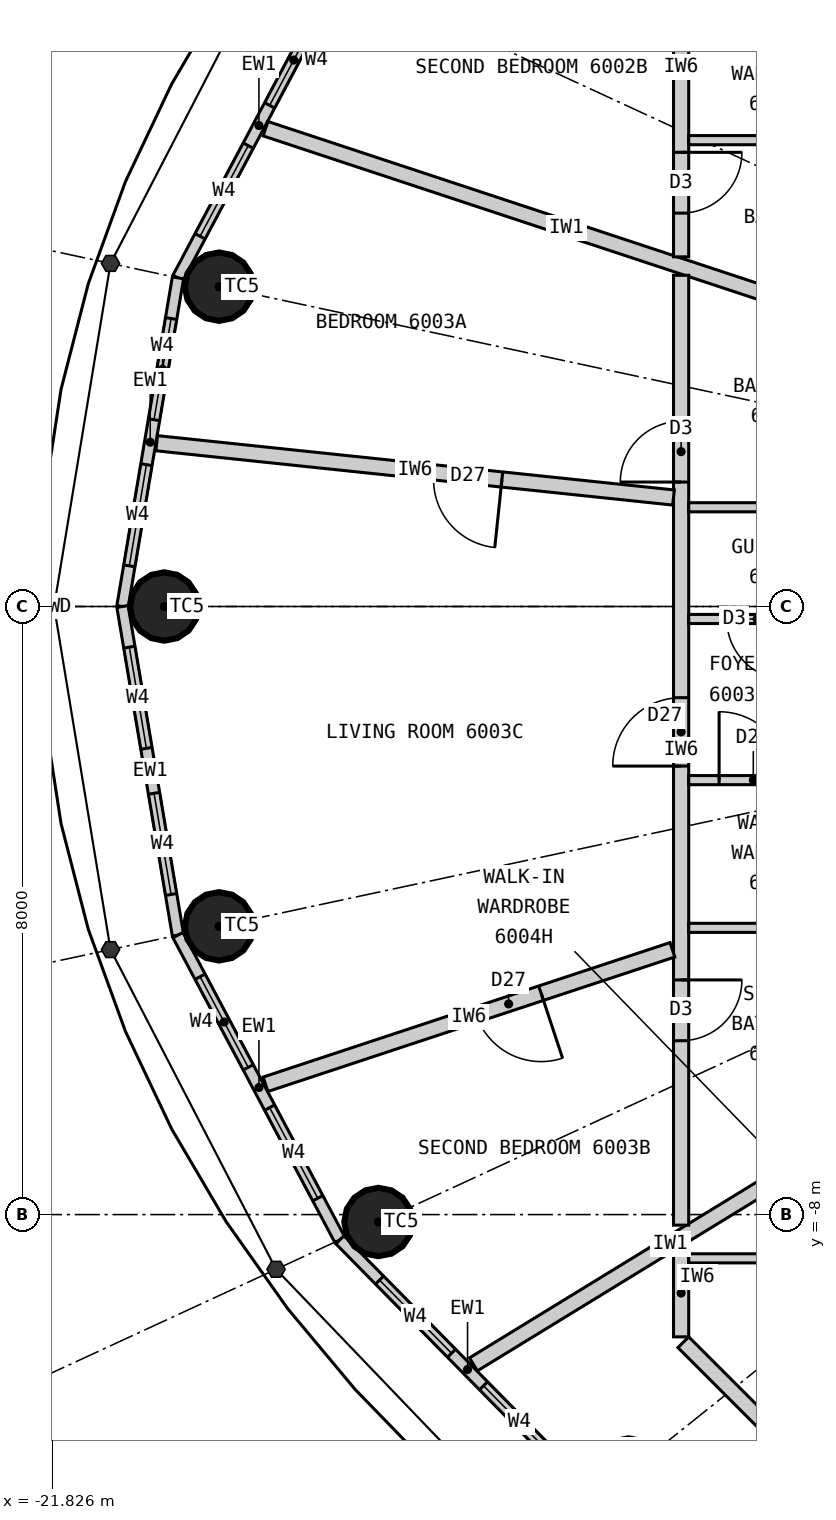
"""IFC4 building model, lengths in metres.
Left out: names, types, materials, properties, quantities, classifications, styles, units other than length and angle.
Written with IfcOpenShell. Run it as: python <this file> out.ifc"""

import sys

from ifc_helpers import new_model, si_unit, direction, frame, frame_2d, origin, origin_2d, place, context, subcontext, project, spatial, rectangle, circle, extrude, element, fill, save


model = new_model("IFC4")
c1 = context("Model", 3, precision=1e-05, world=origin(), true_north=direction((0.0, 1.0)))
c2 = subcontext(c1, "Body", "Model", "MODEL_VIEW")
j1 = project(units=[si_unit("LENGTHUNIT", "METRE"), si_unit("PLANEANGLEUNIT", "RADIAN")], contexts=[c1])
p1 = place(None, origin())
s1 = spatial("IfcSite", under=j1, at=p1, CompositionType="ELEMENT")
p2 = place(p1, origin())
s2 = spatial("IfcBuilding", under=s1, at=p2, CompositionType="ELEMENT")
p3 = place(p2, frame((0.0, 0.0, 222.6)))
s3 = spatial("IfcBuildingStorey", under=s2, at=p3, CompositionType="ELEMENT", Elevation=222.6)
for number, where, z_axis, x_axis in (
    (1, (-19.629, 4.208, 0.0), (0.0, 0.0, 1.0), (1.0, 0.0, 0.0)),
    (2, (-20.35, 0.0, 0.0), (0.0, 0.0, 1.0), (1.0, 0.0, 0.0)),
    (3, (-19.629, -4.208, 0.0), (0.0, 0.0, 1.0), (1.0, 0.0, 0.0)),
    (4, (-17.532, -8.098, 0.0), (0.0, 0.0, 1.0), (1.0, 0.0, 0.0)),
    (5, (-14.241, -11.393, 0.0), (0.0, 0.0, 1.0), (1.0, 0.0, 0.0)),
):
    element("IfcColumn", number, at=place(p3, frame(where, z_axis=z_axis, x_axis=x_axis)), inside=s3, PredefinedType="COLUMN", context=c2, shape_type="SweptSolid", body=[
        extrude(circle(Radius=0.45, at=origin_2d()), origin(), (0.0, 0.0, 1.0), 3.3),
    ])
p4 = place(p3, frame((-18.04, 8.332, 0.0), z_axis=(0.0, 0.0, 1.0), x_axis=(-0.469256152955, -0.883062094597, 0.0)))
e6 = element("IfcWall", 6, at=p4, inside=s3, PredefinedType="ELEMENTEDWALL", context=c2, shape_type="SweptSolid", body=[
    extrude(rectangle(XDim=4.539, YDim=0.15, at=frame_2d((2.27, 0.0))), origin(), (0.0, 0.0, 1.0), 3.12),
])
p5 = place(p4, frame((0.62, 0.0, 0.9)))
e7 = element("IfcOpeningElement", 7, at=p5, cuts=e6, PredefinedType="OPENING", context=c2, shape_type="SweptSolid", body=[
    extrude(rectangle(XDim=1.35, YDim=1.9, at=frame_2d((0.675, 0.95))), frame((0.0, 0.085, 0.0), z_axis=(0.0, -1.0, 0.0), x_axis=(1.0, 0.0, 0.0)), (0.0, 0.0, 1.0), 0.17),
])
p6 = place(p4, frame((2.57, 0.0, 0.9)))
e8 = element("IfcOpeningElement", 8, at=p6, cuts=e6, PredefinedType="OPENING", context=c2, shape_type="SweptSolid", body=[
    extrude(rectangle(XDim=1.35, YDim=1.9, at=frame_2d((0.675, 0.95))), frame((0.0, 0.085, 0.0), z_axis=(0.0, -1.0, 0.0), x_axis=(1.0, 0.0, 0.0)), (0.0, 0.0, 1.0), 0.17),
])
p7 = place(p3, frame((-20.17, 4.323, 0.0), z_axis=(0.0, 0.0, 1.0), x_axis=(-0.166538513568, -0.986034950445, 0.0)))
e9 = element("IfcWall", 9, at=p7, inside=s3, PredefinedType="ELEMENTEDWALL", context=c2, shape_type="SweptSolid", body=[
    extrude(rectangle(XDim=4.385, YDim=0.15, at=frame_2d((2.192, 0.0))), origin(), (0.0, 0.0, 1.0), 3.12),
])
p8 = place(p7, frame((0.542, 0.0, 0.9)))
e10 = element("IfcOpeningElement", 10, at=p8, cuts=e9, PredefinedType="OPENING", context=c2, shape_type="SweptSolid", body=[
    extrude(rectangle(XDim=1.35, YDim=1.9, at=frame_2d((0.675, 0.95))), frame((0.0, 0.085, 0.0), z_axis=(0.0, -1.0, 0.0), x_axis=(1.0, 0.0, 0.0)), (0.0, 0.0, 1.0), 0.17),
])
p9 = place(p7, frame((2.492, 0.0, 0.9)))
e11 = element("IfcOpeningElement", 11, at=p9, cuts=e9, PredefinedType="OPENING", context=c2, shape_type="SweptSolid", body=[
    extrude(rectangle(XDim=1.35, YDim=1.9, at=frame_2d((0.675, 0.95))), frame((0.0, 0.085, 0.0), z_axis=(0.0, -1.0, 0.0), x_axis=(1.0, 0.0, 0.0)), (0.0, 0.0, 1.0), 0.17),
])
p10 = place(p3, frame((-20.9, 0.0, 0.0), z_axis=(0.0, 0.0, 1.0), x_axis=(0.166538513568, -0.986034950445, 0.0)))
e12 = element("IfcWall", 12, at=p10, inside=s3, PredefinedType="ELEMENTEDWALL", context=c2, shape_type="SweptSolid", body=[
    extrude(rectangle(XDim=4.385, YDim=0.15, at=frame_2d((2.192, 0.0))), origin(), (0.0, 0.0, 1.0), 3.12),
])
p11 = place(p10, frame((0.542, 0.0, 0.9)))
e13 = element("IfcOpeningElement", 13, at=p11, cuts=e12, PredefinedType="OPENING", context=c2, shape_type="SweptSolid", body=[
    extrude(rectangle(XDim=1.35, YDim=1.9, at=frame_2d((0.675, 0.95))), frame((0.0, 0.085, 0.0), z_axis=(0.0, -1.0, 0.0), x_axis=(1.0, 0.0, 0.0)), (0.0, 0.0, 1.0), 0.17),
])
p12 = place(p10, frame((2.492, 0.0, 0.9)))
e14 = element("IfcOpeningElement", 14, at=p12, cuts=e12, PredefinedType="OPENING", context=c2, shape_type="SweptSolid", body=[
    extrude(rectangle(XDim=1.35, YDim=1.9, at=frame_2d((0.675, 0.95))), frame((0.0, 0.085, 0.0), z_axis=(0.0, -1.0, 0.0), x_axis=(1.0, 0.0, 0.0)), (0.0, 0.0, 1.0), 0.17),
])
p13 = place(p3, frame((-20.17, -4.323, 0.0), z_axis=(0.0, 0.0, 1.0), x_axis=(0.469256152955, -0.883062094597, 0.0)))
e15 = element("IfcWall", 15, at=p13, inside=s3, PredefinedType="ELEMENTEDWALL", context=c2, shape_type="SweptSolid", body=[
    extrude(rectangle(XDim=4.539, YDim=0.15, at=frame_2d((2.27, 0.0))), origin(), (0.0, 0.0, 1.0), 3.12),
])
p14 = place(p13, frame((0.62, 0.0, 0.9)))
e16 = element("IfcOpeningElement", 16, at=p14, cuts=e15, PredefinedType="OPENING", context=c2, shape_type="SweptSolid", body=[
    extrude(rectangle(XDim=1.35, YDim=1.9, at=frame_2d((0.675, 0.95))), frame((0.0, 0.085, 0.0), z_axis=(0.0, -1.0, 0.0), x_axis=(1.0, 0.0, 0.0)), (0.0, 0.0, 1.0), 0.17),
])
p15 = place(p13, frame((2.57, 0.0, 0.9)))
e17 = element("IfcOpeningElement", 17, at=p15, cuts=e15, PredefinedType="OPENING", context=c2, shape_type="SweptSolid", body=[
    extrude(rectangle(XDim=1.35, YDim=1.9, at=frame_2d((0.675, 0.95))), frame((0.0, 0.085, 0.0), z_axis=(0.0, -1.0, 0.0), x_axis=(1.0, 0.0, 0.0)), (0.0, 0.0, 1.0), 0.17),
])
p16 = place(p3, frame((-18.04, -8.332, 0.0), z_axis=(0.0, 0.0, 1.0), x_axis=(0.701527379618, -0.712642501993, 0.0)))
e18 = element("IfcWall", 18, at=p16, inside=s3, PredefinedType="ELEMENTEDWALL", context=c2, shape_type="SweptSolid", body=[
    extrude(rectangle(XDim=4.788, YDim=0.15, at=frame_2d((2.394, 0.0))), origin(), (0.0, 0.0, 1.0), 3.12),
])
p17 = place(p16, frame((0.744, 0.0, 0.9)))
e19 = element("IfcOpeningElement", 19, at=p17, cuts=e18, PredefinedType="OPENING", context=c2, shape_type="SweptSolid", body=[
    extrude(rectangle(XDim=1.35, YDim=1.9, at=frame_2d((0.675, 0.95))), frame((0.0, 0.085, 0.0), z_axis=(0.0, -1.0, 0.0), x_axis=(1.0, 0.0, 0.0)), (0.0, 0.0, 1.0), 0.17),
])
p18 = place(p16, frame((2.694, 0.0, 0.9)))
e20 = element("IfcOpeningElement", 20, at=p18, cuts=e18, PredefinedType="OPENING", context=c2, shape_type="SweptSolid", body=[
    extrude(rectangle(XDim=1.35, YDim=1.9, at=frame_2d((0.675, 0.95))), frame((0.0, 0.085, 0.0), z_axis=(0.0, -1.0, 0.0), x_axis=(1.0, 0.0, 0.0)), (0.0, 0.0, 1.0), 0.17),
])
p19 = place(p3, frame((-11.1, 3.669, 0.0), z_axis=(0.0, 0.0, 1.0), x_axis=(-0.949476668397, 0.313837627079, 0.0)))
e21 = element("IfcWall", 21, at=p19, inside=s3, PredefinedType="PARTITIONING", context=c2, shape_type="SweptSolid", body=[
    extrude(rectangle(XDim=8.339, YDim=0.2, at=frame_2d((4.169, 0.0))), origin(), (0.0, 0.0, 1.0), 3.12),
])
p20 = place(p3, frame((-11.1, -6.797, 0.0), z_axis=(0.0, 0.0, 1.0), x_axis=(-0.852799818179, -0.522237943963, 0.0)))
e22 = element("IfcWall", 22, at=p20, inside=s3, PredefinedType="PARTITIONING", context=c2, shape_type="SweptSolid", body=[
    extrude(rectangle(XDim=6.077, YDim=0.2, at=frame_2d((3.039, 0.0))), origin(), (0.0, 0.0, 1.0), 3.12),
])
p21 = place(p3, frame((-13.55, 9.609, 0.0), z_axis=(0.0, 0.0, 1.0), x_axis=(0.0, -1.0, 0.0)))
e23 = element("IfcWall", 23, at=p21, inside=s3, PredefinedType="PARTITIONING", context=c2, shape_type="SweptSolid", body=[
    extrude(rectangle(XDim=5.009, YDim=0.2, at=frame_2d((2.504, 0.0))), origin(), (0.0, 0.0, 1.0), 3.12),
])
p22 = place(p21, frame((3.633, 0.0, 0.0)))
e24 = element("IfcOpeningElement", 24, at=p22, cuts=e23, PredefinedType="OPENING", context=c2, shape_type="SweptSolid", body=[
    extrude(rectangle(XDim=0.8, YDim=2.1, at=frame_2d((0.4, 1.05))), frame((0.0, 0.11, 0.0), z_axis=(0.0, -1.0, 0.0), x_axis=(1.0, 0.0, 0.0)), (0.0, 0.0, 1.0), 0.22),
])
p23 = place(p3, frame((-11.1, 6.135, 0.0), z_axis=(0.0, 0.0, 1.0), x_axis=(-1.0, 0.0, 0.0)))
e25 = element("IfcWall", 25, at=p23, inside=s3, PredefinedType="PARTITIONING", context=c2, shape_type="SweptSolid", body=[
    extrude(rectangle(XDim=2.35, YDim=0.12, at=frame_2d((1.175, 0.0))), origin(), (0.0, 0.0, 1.0), 3.12),
])
p24 = place(p3, frame((-13.55, 4.357, 0.0), z_axis=(0.0, 0.0, 1.0), x_axis=(0.0, -1.0, 0.0)))
e26 = element("IfcWall", 26, at=p24, inside=s3, PredefinedType="PARTITIONING", context=c2, shape_type="SweptSolid", body=[
    extrude(rectangle(XDim=12.496, YDim=0.2, at=frame_2d((6.248, 0.0))), origin(), (0.0, 0.0, 1.0), 3.12),
])
p25 = place(p24, frame((1.92, 0.0, 0.0)))
e27 = element("IfcOpeningElement", 27, at=p25, cuts=e26, PredefinedType="OPENING", context=c2, shape_type="SweptSolid", body=[
    extrude(rectangle(XDim=0.8, YDim=2.1, at=frame_2d((0.4, 1.05))), frame((0.0, 0.11, 0.0), z_axis=(0.0, -1.0, 0.0), x_axis=(1.0, 0.0, 0.0)), (0.0, 0.0, 1.0), 0.22),
])
p26 = place(p24, frame((9.27, 0.0, 0.0)))
e28 = element("IfcOpeningElement", 28, at=p26, cuts=e26, PredefinedType="OPENING", context=c2, shape_type="SweptSolid", body=[
    extrude(rectangle(XDim=0.8, YDim=2.1, at=frame_2d((0.4, 1.05))), frame((0.0, 0.11, 0.0), z_axis=(0.0, -1.0, 0.0), x_axis=(1.0, 0.0, 0.0)), (0.0, 0.0, 1.0), 0.22),
])
p27 = place(p24, frame((5.557, 0.0, 0.0)))
e29 = element("IfcOpeningElement", 29, at=p27, cuts=e26, PredefinedType="OPENING", context=c2, shape_type="SweptSolid", body=[
    extrude(rectangle(XDim=0.9, YDim=2.1, at=frame_2d((0.45, 1.05))), frame((0.0, 0.11, 0.0), z_axis=(0.0, -1.0, 0.0), x_axis=(1.0, 0.0, 0.0)), (0.0, 0.0, 1.0), 0.22),
])
p28 = place(p3, frame((-13.65, 1.434, 0.0), z_axis=(0.0, 0.0, 1.0), x_axis=(-0.994526954268, 0.10448031984, 0.0)))
e30 = element("IfcWall", 30, at=p28, inside=s3, PredefinedType="PARTITIONING", context=c2, shape_type="SweptSolid", body=[
    extrude(rectangle(XDim=6.837, YDim=0.2, at=frame_2d((3.418, 0.0))), origin(), (0.0, 0.0, 1.0), 2.47),
])
p29 = place(p28, frame((2.27, 0.0, 0.0)))
e31 = element("IfcOpeningElement", 31, at=p29, cuts=e30, PredefinedType="OPENING", context=c2, shape_type="SweptSolid", body=[
    extrude(rectangle(XDim=0.9, YDim=2.1, at=frame_2d((0.45, 1.05))), frame((0.0, 0.11, 0.0), z_axis=(0.0, -1.0, 0.0), x_axis=(1.0, 0.0, 0.0)), (0.0, 0.0, 1.0), 0.22),
])
p30 = place(p3, frame((-13.664, -4.516, 0.0), z_axis=(0.0, 0.0, 1.0), x_axis=(-0.949481375941, -0.313823384632, 0.0)))
e32 = element("IfcWall", 32, at=p30, inside=s3, PredefinedType="PARTITIONING", context=c2, shape_type="SweptSolid", body=[
    extrude(rectangle(XDim=5.638, YDim=0.2, at=frame_2d((2.819, 0.0))), origin(), (0.0, 0.0, 1.0), 3.12),
])
p31 = place(p30, frame((1.82, 0.0, 0.0)))
e33 = element("IfcOpeningElement", 33, at=p31, cuts=e32, PredefinedType="OPENING", context=c2, shape_type="SweptSolid", body=[
    extrude(rectangle(XDim=0.9, YDim=2.1, at=frame_2d((0.45, 1.05))), frame((0.0, 0.11, 0.0), z_axis=(0.0, -1.0, 0.0), x_axis=(1.0, 0.0, 0.0)), (0.0, 0.0, 1.0), 0.22),
])
p32 = place(p3, frame((-11.1, 1.306, 0.0), z_axis=(0.0, 0.0, 1.0), x_axis=(-1.0, 0.0, 0.0)))
e34 = element("IfcWall", 34, at=p32, inside=s3, PredefinedType="PARTITIONING", context=c2, shape_type="SweptSolid", body=[
    extrude(rectangle(XDim=2.35, YDim=0.12, at=frame_2d((1.175, 0.0))), origin(), (0.0, 0.0, 1.0), 3.12),
])
p33 = place(p3, frame((-11.1, -0.164, 0.0), z_axis=(0.0, 0.0, 1.0), x_axis=(-1.0, 0.0, 0.0)))
e35 = element("IfcWall", 35, at=p33, inside=s3, PredefinedType="PARTITIONING", context=c2, shape_type="SweptSolid", body=[
    extrude(rectangle(XDim=2.35, YDim=0.12, at=frame_2d((1.175, 0.0))), origin(), (0.0, 0.0, 1.0), 3.12),
])
p34 = place(p33, frame((1.05, 0.0, 0.0)))
e36 = element("IfcOpeningElement", 36, at=p34, cuts=e35, PredefinedType="OPENING", context=c2, shape_type="SweptSolid", body=[
    extrude(rectangle(XDim=0.8, YDim=2.1, at=frame_2d((0.4, 1.05))), frame((0.0, 0.07, 0.0), z_axis=(0.0, -1.0, 0.0), x_axis=(1.0, 0.0, 0.0)), (0.0, 0.0, 1.0), 0.14),
])
p35 = place(p3, frame((-11.1, -2.284, 0.0), z_axis=(0.0, 0.0, 1.0), x_axis=(-1.0, 0.0, 0.0)))
e37 = element("IfcWall", 37, at=p35, inside=s3, PredefinedType="PARTITIONING", context=c2, shape_type="SweptSolid", body=[
    extrude(rectangle(XDim=2.35, YDim=0.12, at=frame_2d((1.175, 0.0))), origin(), (0.0, 0.0, 1.0), 3.12),
])
p36 = place(p35, frame((1.05, 0.0, 0.0)))
e38 = element("IfcOpeningElement", 38, at=p36, cuts=e37, PredefinedType="OPENING", context=c2, shape_type="SweptSolid", body=[
    extrude(rectangle(XDim=0.9, YDim=2.1, at=frame_2d((0.45, 1.05))), frame((0.0, 0.07, 0.0), z_axis=(0.0, -1.0, 0.0), x_axis=(1.0, 0.0, 0.0)), (0.0, 0.0, 1.0), 0.14),
])
p37 = place(p3, frame((-11.1, -4.228, 0.0), z_axis=(0.0, 0.0, 1.0), x_axis=(-1.0, 0.0, 0.0)))
e39 = element("IfcWall", 39, at=p37, inside=s3, PredefinedType="PARTITIONING", context=c2, shape_type="SweptSolid", body=[
    extrude(rectangle(XDim=2.35, YDim=0.12, at=frame_2d((1.175, 0.0))), origin(), (0.0, 0.0, 1.0), 3.12),
])
p38 = place(p3, frame((-13.55, -8.456, 0.0), z_axis=(0.0, 0.0, 1.0), x_axis=(0.0, -1.0, 0.0)))
e40 = element("IfcWall", 40, at=p38, inside=s3, PredefinedType="PARTITIONING", context=c2, shape_type="SweptSolid", body=[
    extrude(rectangle(XDim=1.153, YDim=0.2, at=frame_2d((0.576, 0.0))), origin(), (0.0, 0.0, 1.0), 3.12),
])
p39 = place(p3, frame((-13.521, -9.679, 0.0), z_axis=(0.0, 0.0, 1.0), x_axis=(0.707106781187, -0.707106781187, 0.0)))
e41 = element("IfcWall", 41, at=p39, inside=s3, PredefinedType="PARTITIONING", context=c2, shape_type="SweptSolid", body=[
    extrude(rectangle(XDim=4.019, YDim=0.2, at=frame_2d((2.009, 0.0))), origin(), (0.0, 0.0, 1.0), 3.12),
])
p40 = place(p39, frame((1.57, 0.0, 0.0)))
e42 = element("IfcOpeningElement", 42, at=p40, cuts=e41, PredefinedType="OPENING", context=c2, shape_type="SweptSolid", body=[
    extrude(rectangle(XDim=0.9, YDim=2.1, at=frame_2d((0.45, 1.05))), frame((0.0, 0.11, 0.0), z_axis=(0.0, -1.0, 0.0), x_axis=(1.0, 0.0, 0.0)), (0.0, 0.0, 1.0), 0.22),
])
p41 = place(p3, frame((-11.1, -8.576, 0.0), z_axis=(0.0, 0.0, 1.0), x_axis=(-1.0, 0.0, 0.0)))
e43 = element("IfcWall", 43, at=p41, inside=s3, PredefinedType="PARTITIONING", context=c2, shape_type="SweptSolid", body=[
    extrude(rectangle(XDim=2.35, YDim=0.12, at=frame_2d((1.175, 0.0))), origin(), (0.0, 0.0, 1.0), 3.12),
])
p42 = place(p41, frame((0.22, 0.0, 0.0)))
e44 = element("IfcOpeningElement", 44, at=p42, cuts=e43, PredefinedType="OPENING", context=c2, shape_type="SweptSolid", body=[
    extrude(rectangle(XDim=0.9, YDim=2.1, at=frame_2d((0.45, 1.05))), frame((0.0, 0.07, 0.0), z_axis=(0.0, -1.0, 0.0), x_axis=(1.0, 0.0, 0.0)), (0.0, 0.0, 1.0), 0.14),
])
p43 = place(p5, origin())
e45 = element("IfcWindow", 45, at=p43, inside=s3, PartitioningType="SINGLE_PANEL", PredefinedType="WINDOW", context=c2, shape_type="SweptSolid", body=[
    extrude(rectangle(XDim=1.35, YDim=1.9, at=frame_2d((0.675, 0.95))), frame((0.0, 0.03, 0.0), z_axis=(0.0, -1.0, 0.0), x_axis=(1.0, 0.0, 0.0)), (0.0, 0.0, 1.0), 0.06),
])
fill(e7, e45)
p44 = place(p6, origin())
e46 = element("IfcWindow", 46, at=p44, inside=s3, PartitioningType="SINGLE_PANEL", PredefinedType="WINDOW", context=c2, shape_type="SweptSolid", body=[
    extrude(rectangle(XDim=1.35, YDim=1.9, at=frame_2d((0.675, 0.95))), frame((0.0, 0.03, 0.0), z_axis=(0.0, -1.0, 0.0), x_axis=(1.0, 0.0, 0.0)), (0.0, 0.0, 1.0), 0.06),
])
fill(e8, e46)
p45 = place(p8, origin())
e47 = element("IfcWindow", 47, at=p45, inside=s3, PartitioningType="SINGLE_PANEL", PredefinedType="WINDOW", context=c2, shape_type="SweptSolid", body=[
    extrude(rectangle(XDim=1.35, YDim=1.9, at=frame_2d((0.675, 0.95))), frame((0.0, 0.03, 0.0), z_axis=(0.0, -1.0, 0.0), x_axis=(1.0, 0.0, 0.0)), (0.0, 0.0, 1.0), 0.06),
])
fill(e10, e47)
p46 = place(p9, origin())
e48 = element("IfcWindow", 48, at=p46, inside=s3, PartitioningType="SINGLE_PANEL", PredefinedType="WINDOW", context=c2, shape_type="SweptSolid", body=[
    extrude(rectangle(XDim=1.35, YDim=1.9, at=frame_2d((0.675, 0.95))), frame((0.0, 0.03, 0.0), z_axis=(0.0, -1.0, 0.0), x_axis=(1.0, 0.0, 0.0)), (0.0, 0.0, 1.0), 0.06),
])
fill(e11, e48)
p47 = place(p11, origin())
e49 = element("IfcWindow", 49, at=p47, inside=s3, PartitioningType="SINGLE_PANEL", PredefinedType="WINDOW", context=c2, shape_type="SweptSolid", body=[
    extrude(rectangle(XDim=1.35, YDim=1.9, at=frame_2d((0.675, 0.95))), frame((0.0, 0.03, 0.0), z_axis=(0.0, -1.0, 0.0), x_axis=(1.0, 0.0, 0.0)), (0.0, 0.0, 1.0), 0.06),
])
fill(e13, e49)
p48 = place(p12, origin())
e50 = element("IfcWindow", 50, at=p48, inside=s3, PartitioningType="SINGLE_PANEL", PredefinedType="WINDOW", context=c2, shape_type="SweptSolid", body=[
    extrude(rectangle(XDim=1.35, YDim=1.9, at=frame_2d((0.675, 0.95))), frame((0.0, 0.03, 0.0), z_axis=(0.0, -1.0, 0.0), x_axis=(1.0, 0.0, 0.0)), (0.0, 0.0, 1.0), 0.06),
])
fill(e14, e50)
p49 = place(p14, origin())
e51 = element("IfcWindow", 51, at=p49, inside=s3, PartitioningType="SINGLE_PANEL", PredefinedType="WINDOW", context=c2, shape_type="SweptSolid", body=[
    extrude(rectangle(XDim=1.35, YDim=1.9, at=frame_2d((0.675, 0.95))), frame((0.0, 0.03, 0.0), z_axis=(0.0, -1.0, 0.0), x_axis=(1.0, 0.0, 0.0)), (0.0, 0.0, 1.0), 0.06),
])
fill(e16, e51)
p50 = place(p15, origin())
e52 = element("IfcWindow", 52, at=p50, inside=s3, PartitioningType="SINGLE_PANEL", PredefinedType="WINDOW", context=c2, shape_type="SweptSolid", body=[
    extrude(rectangle(XDim=1.35, YDim=1.9, at=frame_2d((0.675, 0.95))), frame((0.0, 0.03, 0.0), z_axis=(0.0, -1.0, 0.0), x_axis=(1.0, 0.0, 0.0)), (0.0, 0.0, 1.0), 0.06),
])
fill(e17, e52)
p51 = place(p17, origin())
e53 = element("IfcWindow", 53, at=p51, inside=s3, PartitioningType="SINGLE_PANEL", PredefinedType="WINDOW", context=c2, shape_type="SweptSolid", body=[
    extrude(rectangle(XDim=1.35, YDim=1.9, at=frame_2d((0.675, 0.95))), frame((0.0, 0.03, 0.0), z_axis=(0.0, -1.0, 0.0), x_axis=(1.0, 0.0, 0.0)), (0.0, 0.0, 1.0), 0.06),
])
fill(e19, e53)
p52 = place(p18, origin())
e54 = element("IfcWindow", 54, at=p52, inside=s3, PartitioningType="SINGLE_PANEL", PredefinedType="WINDOW", context=c2, shape_type="SweptSolid", body=[
    extrude(rectangle(XDim=1.35, YDim=1.9, at=frame_2d((0.675, 0.95))), frame((0.0, 0.03, 0.0), z_axis=(0.0, -1.0, 0.0), x_axis=(1.0, 0.0, 0.0)), (0.0, 0.0, 1.0), 0.06),
])
fill(e20, e54)
p53 = place(p22, origin())
e55 = element("IfcDoor", 55, at=p53, inside=s3, OperationType="SINGLE_SWING_LEFT", PredefinedType="DOOR", context=c2, shape_type="SweptSolid", body=[
    extrude(rectangle(XDim=0.8, YDim=2.1, at=frame_2d((0.4, 1.05))), frame((0.0, 0.025, 0.0), z_axis=(0.0, -1.0, 0.0), x_axis=(1.0, 0.0, 0.0)), (0.0, 0.0, 1.0), 0.05),
])
fill(e24, e55)
p54 = place(p25, origin())
e56 = element("IfcDoor", 56, at=p54, inside=s3, OperationType="SINGLE_SWING_RIGHT", PredefinedType="DOOR", context=c2, shape_type="SweptSolid", body=[
    extrude(rectangle(XDim=0.8, YDim=2.1, at=frame_2d((0.4, 1.05))), frame((0.0, 0.025, 0.0), z_axis=(0.0, -1.0, 0.0), x_axis=(1.0, 0.0, 0.0)), (0.0, 0.0, 1.0), 0.05),
])
fill(e27, e56)
p55 = place(p34, origin())
e57 = element("IfcDoor", 57, at=p55, inside=s3, OperationType="SINGLE_SWING_LEFT", PredefinedType="DOOR", context=c2, shape_type="SweptSolid", body=[
    extrude(rectangle(XDim=0.8, YDim=2.1, at=frame_2d((0.4, 1.05))), frame((0.0, 0.025, 0.0), z_axis=(0.0, -1.0, 0.0), x_axis=(1.0, 0.0, 0.0)), (0.0, 0.0, 1.0), 0.05),
])
fill(e36, e57)
p56 = place(p36, origin())
e58 = element("IfcDoor", 58, at=p56, inside=s3, OperationType="SINGLE_SWING_RIGHT", PredefinedType="DOOR", context=c2, shape_type="SweptSolid", body=[
    extrude(rectangle(XDim=0.9, YDim=2.1, at=frame_2d((0.45, 1.05))), frame((0.0, 0.025, 0.0), z_axis=(0.0, -1.0, 0.0), x_axis=(1.0, 0.0, 0.0)), (0.0, 0.0, 1.0), 0.05),
])
fill(e38, e58)
p57 = place(p26, origin())
e59 = element("IfcDoor", 59, at=p57, inside=s3, OperationType="SINGLE_SWING_LEFT", PredefinedType="DOOR", context=c2, shape_type="SweptSolid", body=[
    extrude(rectangle(XDim=0.8, YDim=2.1, at=frame_2d((0.4, 1.05))), frame((0.0, 0.025, 0.0), z_axis=(0.0, -1.0, 0.0), x_axis=(1.0, 0.0, 0.0)), (0.0, 0.0, 1.0), 0.05),
])
fill(e28, e59)
p58 = place(p27, origin())
e60 = element("IfcDoor", 60, at=p58, inside=s3, OperationType="SINGLE_SWING_RIGHT", PredefinedType="DOOR", context=c2, shape_type="SweptSolid", body=[
    extrude(rectangle(XDim=0.9, YDim=2.1, at=frame_2d((0.45, 1.05))), frame((0.0, 0.025, 0.0), z_axis=(0.0, -1.0, 0.0), x_axis=(1.0, 0.0, 0.0)), (0.0, 0.0, 1.0), 0.05),
])
fill(e29, e60)
p59 = place(p29, origin())
e61 = element("IfcDoor", 61, at=p59, inside=s3, OperationType="SINGLE_SWING_LEFT", PredefinedType="DOOR", context=c2, shape_type="SweptSolid", body=[
    extrude(rectangle(XDim=0.9, YDim=2.1, at=frame_2d((0.45, 1.05))), frame((0.0, 0.025, 0.0), z_axis=(0.0, -1.0, 0.0), x_axis=(1.0, 0.0, 0.0)), (0.0, 0.0, 1.0), 0.05),
])
fill(e31, e61)
p60 = place(p31, origin())
e62 = element("IfcDoor", 62, at=p60, inside=s3, OperationType="SINGLE_SWING_LEFT", PredefinedType="DOOR", context=c2, shape_type="SweptSolid", body=[
    extrude(rectangle(XDim=0.9, YDim=2.1, at=frame_2d((0.45, 1.05))), frame((0.0, 0.025, 0.0), z_axis=(0.0, -1.0, 0.0), x_axis=(1.0, 0.0, 0.0)), (0.0, 0.0, 1.0), 0.05),
])
fill(e33, e62)
save(model, sys.argv[1])
